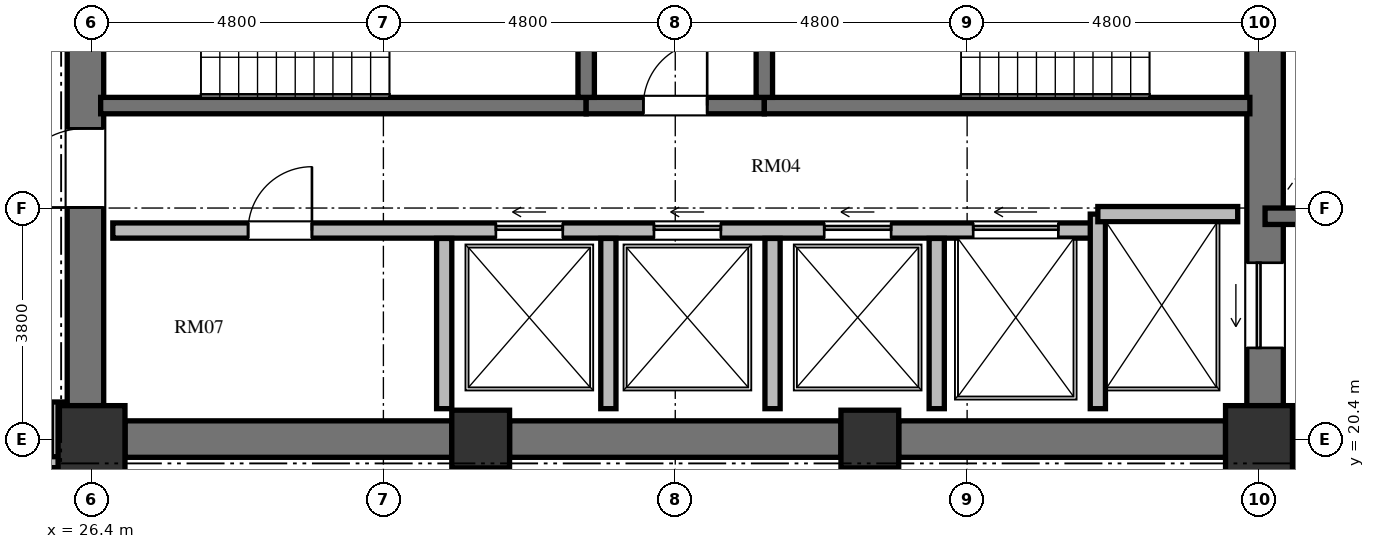
"""IFC4 building model, lengths in metres.
Left out: names, types, materials, properties, quantities, classifications, styles, units other than length and angle.
Written with IfcOpenShell. Run it as: python <this file> out.ifc"""

import sys

from ifc_helpers import new_model, si_unit, direction, frame, frame_2d, origin, origin_2d, place, context, subcontext, project, spatial, rectangle, extrude, element, fill, save


model = new_model("IFC4")
c1 = context("Model", 3, precision=1e-05, world=origin(), true_north=direction((0.0, 1.0)))
c2 = subcontext(c1, "Body", "Model", "MODEL_VIEW")
j1 = project(units=[si_unit("LENGTHUNIT", "METRE"), si_unit("PLANEANGLEUNIT", "RADIAN")], contexts=[c1])
p1 = place(None, origin())
s1 = spatial("IfcSite", under=j1, at=p1, CompositionType="ELEMENT")
p2 = place(p1, origin())
s2 = spatial("IfcBuilding", under=s1, at=p2, CompositionType="ELEMENT")
p3 = place(p2, frame((0.0, 0.0, 156.528)))
s3 = spatial("IfcBuildingStorey", under=s2, at=p3, CompositionType="ELEMENT", Elevation=156.528)
p4 = place(p3, frame((26.4, 20.4, 0.0), z_axis=(0.0, 0.0, 1.0), x_axis=(1.0, 0.0, 0.0)))
e1 = element("IfcColumn", 1, at=p4, inside=s3, PredefinedType="COLUMN", context=c2, shape_type="SweptSolid", body=[
    extrude(rectangle(XDim=1.1, YDim=1.1, at=origin_2d()), origin(), (0.0, 0.0, 1.0), 3.648),
])
for number, where, z_axis, x_axis in (
    (2, (32.8, 20.4, 0.0), (0.0, 0.0, 1.0), (1.0, 0.0, 0.0)),
    (3, (39.2, 20.4, 0.0), (0.0, 0.0, 1.0), (1.0, 0.0, 0.0)),
):
    element("IfcColumn", number, at=place(p3, frame(where, z_axis=z_axis, x_axis=x_axis)), inside=s3, PredefinedType="COLUMN", context=c2, shape_type="SweptSolid", body=[
        extrude(rectangle(XDim=0.95, YDim=0.95, at=origin_2d()), origin(), (0.0, 0.0, 1.0), 3.648),
    ])
p5 = place(p3, frame((45.6, 20.4, 0.0), z_axis=(0.0, 0.0, 1.0), x_axis=(1.0, 0.0, 0.0)))
e4 = element("IfcColumn", 4, at=p5, inside=s3, PredefinedType="COLUMN", context=c2, shape_type="SweptSolid", body=[
    extrude(rectangle(XDim=1.1, YDim=1.1, at=origin_2d()), origin(), (0.0, 0.0, 1.0), 3.648),
])
p6 = place(p3, frame((26.3, 20.95, 0.0), z_axis=(0.0, 0.0, 1.0), x_axis=(0.0, 1.0, 0.0)))
e5 = element("IfcWall", 5, at=p6, inside=s3, PredefinedType="SHEAR", context=c2, shape_type="SweptSolid", body=[
    extrude(rectangle(XDim=14.1, YDim=0.6, at=frame_2d((7.05, 0.0))), origin(), (0.0, 0.0, 1.0), 3.648),
])
p7 = place(p6, frame((6.5, 0.0, 0.0)))
e6 = element("IfcOpeningElement", 6, at=p7, cuts=e5, PredefinedType="OPENING", context=c2, shape_type="SweptSolid", body=[
    extrude(rectangle(XDim=1.2, YDim=2.15, at=frame_2d((0.6, 1.075))), frame((0.0, 0.31, 0.0), z_axis=(0.0, -1.0, 0.0), x_axis=(1.0, 0.0, 0.0)), (0.0, 0.0, 1.0), 0.62),
])
p8 = place(p6, frame((9.6, 0.0, 0.0)))
e7 = element("IfcOpeningElement", 7, at=p8, cuts=e5, PredefinedType="OPENING", context=c2, shape_type="SweptSolid", body=[
    extrude(rectangle(XDim=1.3, YDim=2.2, at=frame_2d((0.65, 1.1))), frame((0.0, 0.31, 0.0), z_axis=(0.0, -1.0, 0.0), x_axis=(1.0, 0.0, 0.0)), (0.0, 0.0, 1.0), 0.62),
])
p9 = place(p6, frame((3.26, 0.0, 0.0)))
e8 = element("IfcOpeningElement", 8, at=p9, cuts=e5, PredefinedType="OPENING", context=c2, shape_type="SweptSolid", body=[
    extrude(rectangle(XDim=1.3, YDim=2.2, at=frame_2d((0.65, 1.1))), frame((0.0, 0.31, 0.0), z_axis=(0.0, -1.0, 0.0), x_axis=(1.0, 0.0, 0.0)), (0.0, 0.0, 1.0), 0.62),
])
p10 = place(p3, frame((45.7, 20.95, 0.0), z_axis=(0.0, 0.0, 1.0), x_axis=(0.0, 1.0, 0.0)))
e9 = element("IfcWall", 9, at=p10, inside=s3, PredefinedType="SHEAR", context=c2, shape_type="SweptSolid", body=[
    extrude(rectangle(XDim=14.1, YDim=0.6, at=frame_2d((7.05, 0.0))), origin(), (0.0, 0.0, 1.0), 3.648),
])
p11 = place(p10, frame((11.75, 0.0, 0.0)))
e10 = element("IfcOpeningElement", 10, at=p11, cuts=e9, PredefinedType="OPENING", context=c2, shape_type="SweptSolid", body=[
    extrude(rectangle(XDim=1.4, YDim=2.3, at=frame_2d((0.7, 1.15))), frame((0.0, 0.31, 0.0), z_axis=(0.0, -1.0, 0.0), x_axis=(1.0, 0.0, 0.0)), (0.0, 0.0, 1.0), 0.62),
])
p12 = place(p10, frame((0.95, 0.0, 0.0)))
e11 = element("IfcOpeningElement", 11, at=p12, cuts=e9, PredefinedType="OPENING", context=c2, shape_type="SweptSolid", body=[
    extrude(rectangle(XDim=1.4, YDim=2.3, at=frame_2d((0.7, 1.15))), frame((0.0, 0.31, 0.0), z_axis=(0.0, -1.0, 0.0), x_axis=(1.0, 0.0, 0.0)), (0.0, 0.0, 1.0), 0.62),
])
p13 = place(p3, frame((26.95, 20.4, 0.0), z_axis=(0.0, 0.0, 1.0), x_axis=(1.0, 0.0, 0.0)))
e12 = element("IfcWall", 12, at=p13, inside=s3, PredefinedType="SHEAR", context=c2, shape_type="SweptSolid", body=[
    extrude(rectangle(XDim=5.375, YDim=0.6, at=frame_2d((2.688, 0.0))), origin(), (0.0, 0.0, 1.0), 3.648),
])
p14 = place(p3, frame((33.275, 20.4, 0.0), z_axis=(0.0, 0.0, 1.0), x_axis=(1.0, 0.0, 0.0)))
e13 = element("IfcWall", 13, at=p14, inside=s3, PredefinedType="SHEAR", context=c2, shape_type="SweptSolid", body=[
    extrude(rectangle(XDim=5.45, YDim=0.6, at=frame_2d((2.725, 0.0))), origin(), (0.0, 0.0, 1.0), 3.648),
])
p15 = place(p3, frame((39.675, 20.4, 0.0), z_axis=(0.0, 0.0, 1.0), x_axis=(1.0, 0.0, 0.0)))
e14 = element("IfcWall", 14, at=p15, inside=s3, PredefinedType="SHEAR", context=c2, shape_type="SweptSolid", body=[
    extrude(rectangle(XDim=5.375, YDim=0.6, at=frame_2d((2.688, 0.0))), origin(), (0.0, 0.0, 1.0), 3.648),
])
p16 = place(p3, frame((26.55, 25.885, 0.0), z_axis=(0.0, 0.0, 1.0), x_axis=(1.0, 0.0, 0.0)))
e15 = element("IfcWall", 15, at=p16, inside=s3, PredefinedType="SHEAR", context=c2, shape_type="SweptSolid", body=[
    extrude(rectangle(XDim=7.985, YDim=0.27, at=frame_2d((3.992, 0.0))), origin(), (0.0, 0.0, 1.0), 3.648),
])
p17 = place(p3, frame((34.535, 25.885, 0.0), z_axis=(0.0, 0.0, 1.0), x_axis=(1.0, 0.0, 0.0)))
e16 = element("IfcWall", 16, at=p17, inside=s3, PredefinedType="SHEAR", context=c2, shape_type="SweptSolid", body=[
    extrude(rectangle(XDim=2.93, YDim=0.27, at=frame_2d((1.465, 0.0))), origin(), (0.0, 0.0, 1.0), 3.648),
])
p18 = place(p17, frame((0.94, 0.0, 0.0)))
e17 = element("IfcOpeningElement", 17, at=p18, cuts=e16, PredefinedType="OPENING", context=c2, shape_type="SweptSolid", body=[
    extrude(rectangle(XDim=1.05, YDim=2.15, at=frame_2d((0.525, 1.075))), frame((0.0, 0.145, 0.0), z_axis=(0.0, -1.0, 0.0), x_axis=(1.0, 0.0, 0.0)), (0.0, 0.0, 1.0), 0.29),
])
p19 = place(p3, frame((37.465, 25.885, 0.0), z_axis=(0.0, 0.0, 1.0), x_axis=(1.0, 0.0, 0.0)))
e18 = element("IfcWall", 18, at=p19, inside=s3, PredefinedType="SHEAR", context=c2, shape_type="SweptSolid", body=[
    extrude(rectangle(XDim=7.985, YDim=0.27, at=frame_2d((3.992, 0.0))), origin(), (0.0, 0.0, 1.0), 3.648),
])
for number, where, z_axis, x_axis in (
    (19, (34.535, 26.02, 0.0), (0.0, 0.0, 1.0), (0.0, 1.0, 0.0)),
    (20, (37.465, 26.02, 0.0), (0.0, 0.0, 1.0), (0.0, 1.0, 0.0)),
):
    element("IfcWall", number, at=place(p3, frame(where, z_axis=z_axis, x_axis=x_axis)), inside=s3, PredefinedType="SHEAR", context=c2, shape_type="SweptSolid", body=[
        extrude(rectangle(XDim=4.08, YDim=0.27, at=frame_2d((2.04, 0.0))), origin(), (0.0, 0.0, 1.0), 3.648),
    ])
p20 = place(p3, frame((26.75, 23.83, 0.0), z_axis=(0.0, 0.0, 1.0), x_axis=(1.0, 0.0, 0.0)))
e21 = element("IfcWall", 21, at=p20, inside=s3, PredefinedType="SOLIDWALL", context=c2, shape_type="SweptSolid", body=[
    extrude(rectangle(XDim=16.2, YDim=0.25, at=frame_2d((8.1, 0.0))), origin(), (0.0, 0.0, 1.0), 3.428),
])
p21 = place(p20, frame((2.225, 0.0, 0.0)))
e22 = element("IfcOpeningElement", 22, at=p21, cuts=e21, PredefinedType="OPENING", context=c2, shape_type="SweptSolid", body=[
    extrude(rectangle(XDim=1.05, YDim=2.15, at=frame_2d((0.525, 1.075))), frame((0.0, 0.135, 0.0), z_axis=(0.0, -1.0, 0.0), x_axis=(1.0, 0.0, 0.0)), (0.0, 0.0, 1.0), 0.27),
])
p22 = place(p20, frame((6.3, 0.0, 0.0)))
e23 = element("IfcOpeningElement", 23, at=p22, cuts=e21, PredefinedType="OPENING", context=c2, shape_type="SweptSolid", body=[
    extrude(rectangle(XDim=1.1, YDim=2.2, at=frame_2d((0.55, 1.1))), frame((0.0, 0.135, 0.0), z_axis=(0.0, -1.0, 0.0), x_axis=(1.0, 0.0, 0.0)), (0.0, 0.0, 1.0), 0.27),
])
p23 = place(p20, frame((8.9, 0.0, 0.0)))
e24 = element("IfcOpeningElement", 24, at=p23, cuts=e21, PredefinedType="OPENING", context=c2, shape_type="SweptSolid", body=[
    extrude(rectangle(XDim=1.1, YDim=2.2, at=frame_2d((0.55, 1.1))), frame((0.0, 0.135, 0.0), z_axis=(0.0, -1.0, 0.0), x_axis=(1.0, 0.0, 0.0)), (0.0, 0.0, 1.0), 0.27),
])
p24 = place(p20, frame((11.7, 0.0, 0.0)))
e25 = element("IfcOpeningElement", 25, at=p24, cuts=e21, PredefinedType="OPENING", context=c2, shape_type="SweptSolid", body=[
    extrude(rectangle(XDim=1.1, YDim=2.2, at=frame_2d((0.55, 1.1))), frame((0.0, 0.135, 0.0), z_axis=(0.0, -1.0, 0.0), x_axis=(1.0, 0.0, 0.0)), (0.0, 0.0, 1.0), 0.27),
])
p25 = place(p20, frame((14.15, 0.0, 0.0)))
e26 = element("IfcOpeningElement", 26, at=p25, cuts=e21, PredefinedType="OPENING", context=c2, shape_type="SweptSolid", body=[
    extrude(rectangle(XDim=1.4, YDim=2.3, at=frame_2d((0.7, 1.15))), frame((0.0, 0.135, 0.0), z_axis=(0.0, -1.0, 0.0), x_axis=(1.0, 0.0, 0.0)), (0.0, 0.0, 1.0), 0.27),
])
p26 = place(p3, frame((42.95, 20.9, 0.0), z_axis=(0.0, 0.0, 1.0), x_axis=(0.0, 1.0, 0.0)))
e27 = element("IfcWall", 27, at=p26, inside=s3, PredefinedType="SOLIDWALL", context=c2, shape_type="SweptSolid", body=[
    extrude(rectangle(XDim=3.2, YDim=0.25, at=frame_2d((1.6, 0.0))), origin(), (0.0, 0.0, 1.0), 3.428),
])
p27 = place(p3, frame((42.95, 24.1, 0.0), z_axis=(0.0, 0.0, 1.0), x_axis=(1.0, 0.0, 0.0)))
e28 = element("IfcWall", 28, at=p27, inside=s3, PredefinedType="SOLIDWALL", context=c2, shape_type="SweptSolid", body=[
    extrude(rectangle(XDim=2.3, YDim=0.25, at=frame_2d((1.15, 0.0))), origin(), (0.0, 0.0, 1.0), 3.428),
])
for number, where, z_axis, x_axis in (
    (29, (32.2, 20.9, 0.0), (0.0, 0.0, 1.0), (0.0, 1.0, 0.0)),
    (30, (34.9, 20.9, 0.0), (0.0, 0.0, 1.0), (0.0, 1.0, 0.0)),
    (31, (37.6, 20.9, 0.0), (0.0, 0.0, 1.0), (0.0, 1.0, 0.0)),
    (32, (40.3, 20.9, 0.0), (0.0, 0.0, 1.0), (0.0, 1.0, 0.0)),
):
    element("IfcWall", number, at=place(p3, frame(where, z_axis=z_axis, x_axis=x_axis)), inside=s3, PredefinedType="SOLIDWALL", context=c2, shape_type="SweptSolid", body=[
        extrude(rectangle(XDim=2.8, YDim=0.25, at=frame_2d((1.4, 0.0))), origin(), (0.0, 0.0, 1.0), 3.428),
    ])
p28 = place(p3, frame((45.7, 24.065, 0.0), z_axis=(0.0, 0.0, 1.0), x_axis=(1.0, 0.0, 0.0)))
e33 = element("IfcWall", 33, at=p28, inside=s3, PredefinedType="SHEAR", context=c2, shape_type="SweptSolid", body=[
    extrude(rectangle(XDim=4.715, YDim=0.27, at=frame_2d((2.357, 0.0))), origin(), (0.0, 0.0, 1.0), 3.648),
])
p29 = place(p3, frame((45.7, 20.02, 0.0), z_axis=(0.0, 0.0, 1.0), x_axis=(1.0, 0.0, 0.0)))
e34 = element("IfcWall", 34, at=p29, inside=s3, PredefinedType="SOLIDWALL", context=c2, shape_type="SweptSolid", body=[
    extrude(rectangle(XDim=4.715, YDim=0.25, at=frame_2d((2.357, 0.0))), origin(), (0.0, 0.0, 1.0), 3.428),
])
p30 = place(p3, frame((25.83, 21.01, 0.0), z_axis=(0.0, 0.0, 1.0), x_axis=(0.0, -1.0, 0.0)))
e35 = element("IfcWall", 35, at=p30, inside=s3, PredefinedType="PARTITIONING", context=c2, shape_type="SweptSolid", body=[
    extrude(rectangle(XDim=1.03, YDim=0.18, at=frame_2d((0.515, 0.0))), origin(), (0.0, 0.0, 1.0), 3.428),
])
p31 = place(p3, frame((25.87, 20.02, 0.0), z_axis=(0.0, 0.0, 1.0), x_axis=(-1.0, 0.0, 0.0)))
e36 = element("IfcWall", 36, at=p31, inside=s3, PredefinedType="PARTITIONING", context=c2, shape_type="SweptSolid", body=[
    extrude(rectangle(XDim=2.56, YDim=0.18, at=frame_2d((1.28, 0.0))), origin(), (0.0, 0.0, 1.0), 3.428),
])
p32 = place(p18, origin())
e37 = element("IfcDoor", 37, at=p32, inside=s3, OperationType="SINGLE_SWING_RIGHT", PredefinedType="DOOR", context=c2, shape_type="SweptSolid", body=[
    extrude(rectangle(XDim=1.05, YDim=2.15, at=frame_2d((0.525, 1.075))), frame((0.0, 0.025, 0.0), z_axis=(0.0, -1.0, 0.0), x_axis=(1.0, 0.0, 0.0)), (0.0, 0.0, 1.0), 0.05),
])
fill(e17, e37)
p33 = place(p9, origin())
e38 = element("IfcDoor", 38, at=p33, inside=s3, OperationType="SINGLE_SWING_LEFT", PredefinedType="DOOR", context=c2, shape_type="SweptSolid", body=[
    extrude(rectangle(XDim=1.3, YDim=2.2, at=frame_2d((0.65, 1.1))), frame((0.0, 0.025, 0.0), z_axis=(0.0, -1.0, 0.0), x_axis=(1.0, 0.0, 0.0)), (0.0, 0.0, 1.0), 0.05),
])
fill(e8, e38)
p34 = place(p21, origin())
e39 = element("IfcDoor", 39, at=p34, inside=s3, OperationType="SINGLE_SWING_RIGHT", PredefinedType="DOOR", context=c2, shape_type="SweptSolid", body=[
    extrude(rectangle(XDim=1.05, YDim=2.15, at=frame_2d((0.525, 1.075))), frame((0.0, 0.025, 0.0), z_axis=(0.0, -1.0, 0.0), x_axis=(1.0, 0.0, 0.0)), (0.0, 0.0, 1.0), 0.05),
])
fill(e22, e39)
p35 = place(p22, origin())
e40 = element("IfcDoor", 40, at=p35, inside=s3, OperationType="SLIDING_TO_LEFT", PredefinedType="DOOR", context=c2, shape_type="SweptSolid", body=[
    extrude(rectangle(XDim=1.1, YDim=2.2, at=frame_2d((0.55, 1.1))), frame((0.0, 0.025, 0.0), z_axis=(0.0, -1.0, 0.0), x_axis=(1.0, 0.0, 0.0)), (0.0, 0.0, 1.0), 0.05),
])
fill(e23, e40)
p36 = place(p23, origin())
e41 = element("IfcDoor", 41, at=p36, inside=s3, OperationType="SLIDING_TO_LEFT", PredefinedType="DOOR", context=c2, shape_type="SweptSolid", body=[
    extrude(rectangle(XDim=1.1, YDim=2.2, at=frame_2d((0.55, 1.1))), frame((0.0, 0.025, 0.0), z_axis=(0.0, -1.0, 0.0), x_axis=(1.0, 0.0, 0.0)), (0.0, 0.0, 1.0), 0.05),
])
fill(e24, e41)
p37 = place(p24, origin())
e42 = element("IfcDoor", 42, at=p37, inside=s3, OperationType="SLIDING_TO_LEFT", PredefinedType="DOOR", context=c2, shape_type="SweptSolid", body=[
    extrude(rectangle(XDim=1.1, YDim=2.2, at=frame_2d((0.55, 1.1))), frame((0.0, 0.025, 0.0), z_axis=(0.0, -1.0, 0.0), x_axis=(1.0, 0.0, 0.0)), (0.0, 0.0, 1.0), 0.05),
])
fill(e25, e42)
p38 = place(p12, origin())
e43 = element("IfcDoor", 43, at=p38, inside=s3, OperationType="SLIDING_TO_LEFT", PredefinedType="DOOR", context=c2, shape_type="SweptSolid", body=[
    extrude(rectangle(XDim=1.4, YDim=2.3, at=frame_2d((0.7, 1.15))), frame((0.0, 0.025, 0.0), z_axis=(0.0, -1.0, 0.0), x_axis=(1.0, 0.0, 0.0)), (0.0, 0.0, 1.0), 0.05),
])
fill(e11, e43)
p39 = place(p25, origin())
e44 = element("IfcDoor", 44, at=p39, inside=s3, OperationType="SLIDING_TO_LEFT", PredefinedType="DOOR", context=c2, shape_type="SweptSolid", body=[
    extrude(rectangle(XDim=1.4, YDim=2.3, at=frame_2d((0.7, 1.15))), frame((0.0, 0.025, 0.0), z_axis=(0.0, -1.0, 0.0), x_axis=(1.0, 0.0, 0.0)), (0.0, 0.0, 1.0), 0.05),
])
fill(e26, e44)
save(model, sys.argv[1])
